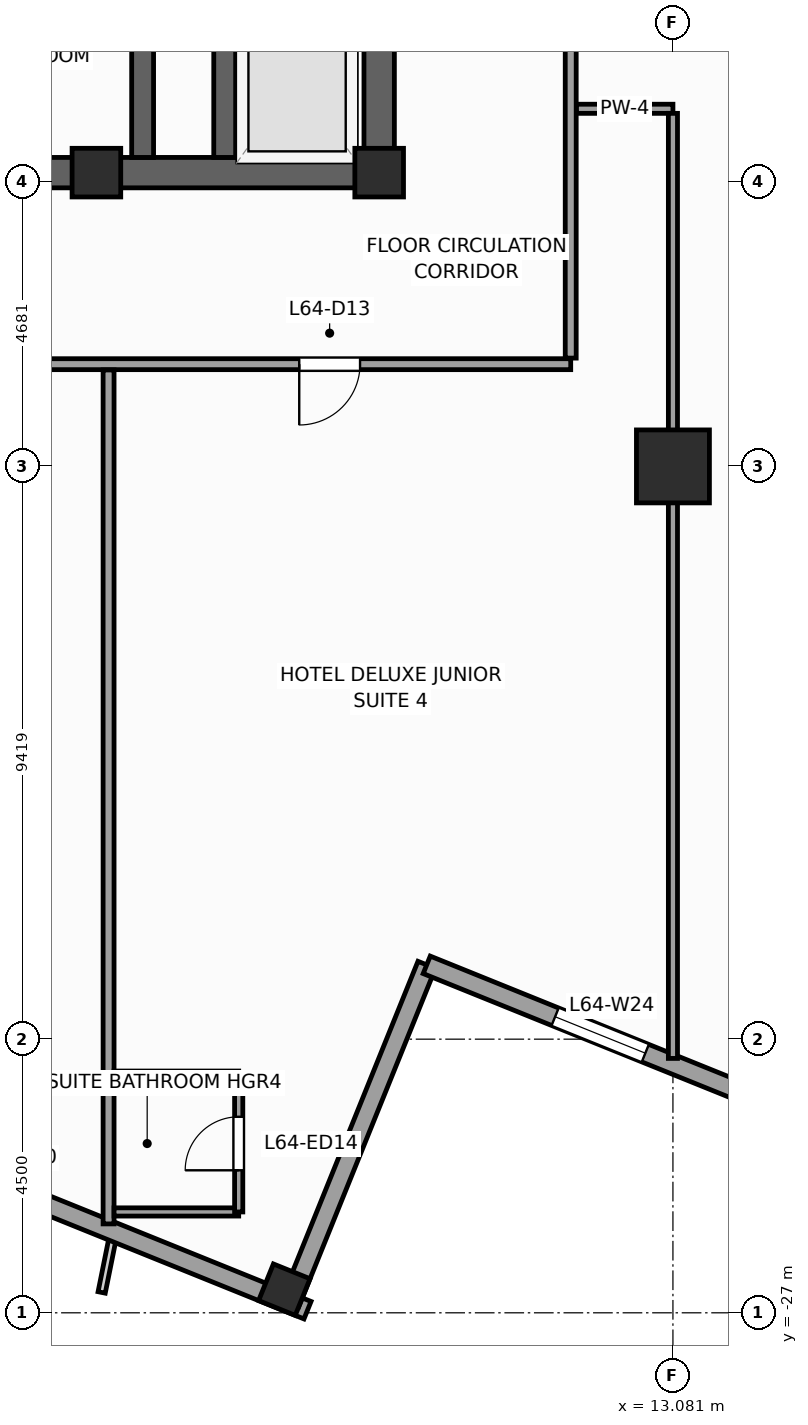
"""IFC4 building model, lengths in metres.
Left out: names, types, materials, properties, quantities, classifications, styles, units other than length and angle.
Written with IfcOpenShell. Run it as: python <this file> out.ifc"""

import sys

from ifc_helpers import new_model, si_unit, direction, frame, frame_2d, origin, origin_2d, place, context, subcontext, project, spatial, rectangle, extrude, source, transform, mapped, element, fill, save


model = new_model("IFC4")
c1 = context("Model", 3, precision=1e-05, world=origin(), true_north=direction((0.0, 1.0)))
c2 = subcontext(c1, "Body", "Model", "MODEL_VIEW")
j1 = project(units=[si_unit("LENGTHUNIT", "METRE"), si_unit("PLANEANGLEUNIT", "RADIAN")], contexts=[c1])
p1 = place(None, origin())
s1 = spatial("IfcSite", under=j1, at=p1, CompositionType="ELEMENT")
p2 = place(p1, origin())
s2 = spatial("IfcBuilding", under=s1, at=p2, CompositionType="ELEMENT")
p3 = place(p2, frame((0.0, 0.0, 265.2)))
s3 = spatial("IfcBuildingStorey", under=s2, at=p3, CompositionType="ELEMENT", Elevation=265.2)
p4 = place(p3, frame((-8.5, -8.25, 0.0), z_axis=(0.0, 0.0, 1.0), x_axis=(1.0, 0.0, 0.0)))
e1 = element("IfcWall", 1, at=p4, inside=s3, PredefinedType="SHEAR", context=c2, shape_type="SweptSolid", body=[
    extrude(rectangle(XDim=17.0, YDim=0.5, at=frame_2d((8.5, 0.0))), origin(), (0.0, 0.0, 1.0), 3.6),
])
p5 = place(p4, frame((7.85, 0.0, 0.0)))
e2 = element("IfcOpeningElement", 2, at=p5, cuts=e1, PredefinedType="OPENING", context=c2, shape_type="SweptSolid", body=[
    extrude(rectangle(XDim=1.3, YDim=2.2, at=frame_2d((0.65, 1.1))), frame((0.0, 0.26, 0.0), z_axis=(0.0, -1.0, 0.0), x_axis=(1.0, 0.0, 0.0)), (0.0, 0.0, 1.0), 0.52),
])
p6 = place(p3, frame((8.25, -8.0, 0.0), z_axis=(0.0, 0.0, 1.0), x_axis=(0.0, 1.0, 0.0)))
e3 = element("IfcWall", 3, at=p6, inside=s3, PredefinedType="SHEAR", context=c2, shape_type="SweptSolid", body=[
    extrude(rectangle(XDim=16.0, YDim=0.5, at=frame_2d((8.0, 0.0))), origin(), (0.0, 0.0, 1.0), 3.6),
])
p7 = place(p6, frame((4.69, 0.0, 0.0)))
e4 = element("IfcOpeningElement", 4, at=p7, cuts=e3, PredefinedType="OPENING", context=c2, shape_type="SweptSolid", body=[
    extrude(rectangle(XDim=1.3, YDim=2.2, at=frame_2d((0.65, 1.1))), frame((0.0, 0.26, 0.0), z_axis=(0.0, -1.0, 0.0), x_axis=(1.0, 0.0, 0.0)), (0.0, 0.0, 1.0), 0.52),
])
p8 = place(p3, frame((4.36, -8.0, 0.0), z_axis=(0.0, 0.0, 1.0), x_axis=(0.0, 1.0, 0.0)))
e5 = element("IfcWall", 5, at=p8, inside=s3, PredefinedType="SHEAR", context=c2, shape_type="SweptSolid", body=[
    extrude(rectangle(XDim=16.0, YDim=0.36, at=frame_2d((8.0, 0.0))), origin(), (0.0, 0.0, 1.0), 3.6),
])
p9 = place(p3, frame((5.71, -8.0, 0.0), z_axis=(0.0, 0.0, 1.0), x_axis=(0.0, 1.0, 0.0)))
e6 = element("IfcWall", 6, at=p9, inside=s3, PredefinedType="SHEAR", context=c2, shape_type="SweptSolid", body=[
    extrude(rectangle(XDim=2.54, YDim=0.36, at=frame_2d((1.27, 0.0))), origin(), (0.0, 0.0, 1.0), 3.6),
])
m1 = source(origin(), c2, "Body", "SweptSolid", [
    extrude(rectangle(XDim=0.8, YDim=0.8, at=origin_2d()), origin(), (0.0, 0.0, 1.0), 3.6),
])
for number, where, z_axis, x_axis in (
    (7, (8.25, -8.25, 0.0), (0.0, 0.0, 1.0), (1.0, 0.0, 0.0)),
    (8, (3.6, -8.25, 0.0), (0.0, 0.0, 1.0), (1.0, 0.0, 0.0)),
):
    element("IfcColumn", number, at=place(p3, frame(where, z_axis=z_axis, x_axis=x_axis)), inside=s3, PredefinedType="PILASTER", context=c2, shape_type="MappedRepresentation", body=[
        mapped(m1, transform((0.0, 0.0, 0.0), scale=1.0)),
    ])
m2 = source(origin(), c2, "Body", "SweptSolid", [
    extrude(rectangle(XDim=1.2, YDim=1.2, at=origin_2d()), origin(), (0.0, 0.0, 1.0), 3.6),
])
p10 = place(p3, frame((13.081, -13.081, 0.0), z_axis=(0.0, 0.0, 1.0), x_axis=(1.0, 0.0, 0.0)))
e9 = element("IfcColumn", 9, at=p10, inside=s3, PredefinedType="COLUMN", context=c2, shape_type="MappedRepresentation", body=[
    mapped(m2, transform((0.0, 0.0, 0.0), scale=1.0)),
])
m3 = source(origin(), c2, "Body", "SweptSolid", [
    extrude(rectangle(XDim=0.65, YDim=0.65, at=origin_2d()), origin(), (0.0, 0.0, 1.0), 3.6),
])
p11 = place(p3, frame((6.69, -26.62, 0.0), z_axis=(0.0, 0.0, 1.0), x_axis=(0.374606593416, 0.927183854567, 0.0)))
e10 = element("IfcColumn", 10, at=p11, inside=s3, PredefinedType="COLUMN", context=c2, shape_type="MappedRepresentation", body=[
    mapped(m3, transform((0.0, 0.0, 0.0), scale=1.0)),
])
p12 = place(p3, frame((-23.813, -14.479, 0.0), z_axis=(0.0, 0.0, 1.0), x_axis=(0.927182657188, -0.374609557019, 0.0)))
e11 = element("IfcWall", 11, at=p12, inside=s3, PredefinedType="STANDARD", context=c2, shape_type="SweptSolid", body=[
    extrude(rectangle(XDim=33.31, YDim=0.31, at=frame_2d((16.655, 0.0))), origin(), (0.0, 0.0, 1.0), 2.75),
])
p13 = place(p12, frame((22.58, 0.0, 0.0)))
e12 = element("IfcOpeningElement", 12, at=p13, cuts=e11, PredefinedType="OPENING", context=c2, shape_type="SweptSolid", body=[
    extrude(rectangle(XDim=1.05, YDim=2.25, at=frame_2d((0.525, 1.125))), frame((0.0, 0.165, 0.0), z_axis=(0.0, -1.0, 0.0), x_axis=(1.0, 0.0, 0.0)), (0.0, 0.0, 1.0), 0.33),
])
p14 = place(p12, frame((3.197, 0.0, 0.47)))
e13 = element("IfcOpeningElement", 13, at=p14, cuts=e11, PredefinedType="OPENING", context=c2, shape_type="SweptSolid", body=[
    extrude(rectangle(XDim=1.6, YDim=2.1, at=frame_2d((0.8, 1.05))), frame((0.0, 0.165, 0.0), z_axis=(0.0, -1.0, 0.0), x_axis=(1.0, 0.0, 0.0)), (0.0, 0.0, 1.0), 0.33),
])
p15 = place(p12, frame((8.86, 0.0, 0.47)))
e14 = element("IfcOpeningElement", 14, at=p15, cuts=e11, PredefinedType="OPENING", context=c2, shape_type="SweptSolid", body=[
    extrude(rectangle(XDim=1.6, YDim=2.1, at=frame_2d((0.8, 1.05))), frame((0.0, 0.165, 0.0), z_axis=(0.0, -1.0, 0.0), x_axis=(1.0, 0.0, 0.0)), (0.0, 0.0, 1.0), 0.33),
])
p16 = place(p12, frame((14.439, 0.0, 0.47)))
e15 = element("IfcOpeningElement", 15, at=p16, cuts=e11, PredefinedType="OPENING", context=c2, shape_type="SweptSolid", body=[
    extrude(rectangle(XDim=1.6, YDim=2.1, at=frame_2d((0.8, 1.05))), frame((0.0, 0.165, 0.0), z_axis=(0.0, -1.0, 0.0), x_axis=(1.0, 0.0, 0.0)), (0.0, 0.0, 1.0), 0.33),
])
p17 = place(p12, frame((19.601, 0.0, 0.47)))
e16 = element("IfcOpeningElement", 16, at=p17, cuts=e11, PredefinedType="OPENING", context=c2, shape_type="SweptSolid", body=[
    extrude(rectangle(XDim=1.6, YDim=2.1, at=frame_2d((0.8, 1.05))), frame((0.0, 0.165, 0.0), z_axis=(0.0, -1.0, 0.0), x_axis=(1.0, 0.0, 0.0)), (0.0, 0.0, 1.0), 0.33),
])
p18 = place(p12, frame((27.097, 0.0, 0.47)))
e17 = element("IfcOpeningElement", 17, at=p18, cuts=e11, PredefinedType="OPENING", context=c2, shape_type="SweptSolid", body=[
    extrude(rectangle(XDim=1.6, YDim=2.1, at=frame_2d((0.8, 1.05))), frame((0.0, 0.165, 0.0), z_axis=(0.0, -1.0, 0.0), x_axis=(1.0, 0.0, 0.0)), (0.0, 0.0, 1.0), 0.33),
])
p19 = place(p3, frame((6.784, -26.841, 0.0), z_axis=(0.0, 0.0, 1.0), x_axis=(0.374636620962, 0.927171722085, 0.0)))
e18 = element("IfcWall", 18, at=p19, inside=s3, PredefinedType="STANDARD", context=c2, shape_type="SweptSolid", body=[
    extrude(rectangle(XDim=6.0, YDim=0.31, at=frame_2d((3.0, 0.0))), origin(), (0.0, 0.0, 1.0), 2.65),
])
p20 = place(p3, frame((9.032, -21.278, 0.0), z_axis=(0.0, 0.0, 1.0), x_axis=(0.927185411764, -0.374602739196, 0.0)))
e19 = element("IfcWall", 19, at=p20, inside=s3, PredefinedType="STANDARD", context=c2, shape_type="SweptSolid", body=[
    extrude(rectangle(XDim=6.155, YDim=0.31, at=frame_2d((3.078, 0.0))), origin(), (0.0, 0.0, 1.0), 3.35),
])
p21 = place(p20, frame((2.278, 0.0, 0.47)))
e20 = element("IfcOpeningElement", 20, at=p21, cuts=e19, PredefinedType="OPENING", context=c2, shape_type="SweptSolid", body=[
    extrude(rectangle(XDim=1.6, YDim=2.1, at=frame_2d((0.8, 1.05))), frame((0.0, 0.165, 0.0), z_axis=(0.0, -1.0, 0.0), x_axis=(1.0, 0.0, 0.0)), (0.0, 0.0, 1.0), 0.33),
])
p22 = place(p3, frame((-10.3, -11.4, 0.0), z_axis=(0.0, 0.0, 1.0), x_axis=(1.0, 0.0, 0.0)))
e21 = element("IfcWall", 21, at=p22, inside=s3, PredefinedType="PARTITIONING", context=c2, shape_type="SweptSolid", body=[
    extrude(rectangle(XDim=21.7, YDim=0.18, at=frame_2d((10.85, 0.0))), origin(), (0.0, 0.0, 1.0), 3.35),
])
p23 = place(p22, frame((1.605, 0.0, 0.0)))
e22 = element("IfcOpeningElement", 22, at=p23, cuts=e21, PredefinedType="OPENING", context=c2, shape_type="SweptSolid", body=[
    extrude(rectangle(XDim=0.95, YDim=2.1, at=frame_2d((0.475, 1.05))), frame((0.0, 0.1, 0.0), z_axis=(0.0, -1.0, 0.0), x_axis=(1.0, 0.0, 0.0)), (0.0, 0.0, 1.0), 0.2),
])
p24 = place(p22, frame((17.236, 0.0, 0.0)))
e23 = element("IfcOpeningElement", 23, at=p24, cuts=e21, PredefinedType="OPENING", context=c2, shape_type="SweptSolid", body=[
    extrude(rectangle(XDim=1.0, YDim=2.15, at=frame_2d((0.5, 1.075))), frame((0.0, 0.1, 0.0), z_axis=(0.0, -1.0, 0.0), x_axis=(1.0, 0.0, 0.0)), (0.0, 0.0, 1.0), 0.2),
])
p25 = place(p22, frame((9.8, 0.0, 0.0)))
e24 = element("IfcOpeningElement", 24, at=p25, cuts=e21, PredefinedType="OPENING", context=c2, shape_type="SweptSolid", body=[
    extrude(rectangle(XDim=1.0, YDim=2.15, at=frame_2d((0.5, 1.075))), frame((0.0, 0.1, 0.0), z_axis=(0.0, -1.0, 0.0), x_axis=(1.0, 0.0, 0.0)), (0.0, 0.0, 1.0), 0.2),
])
p26 = place(p3, frame((11.4, -11.3, 0.0), z_axis=(0.0, 0.0, 1.0), x_axis=(0.0, 1.0, 0.0)))
e25 = element("IfcWall", 25, at=p26, inside=s3, PredefinedType="PARTITIONING", context=c2, shape_type="SweptSolid", body=[
    extrude(rectangle(XDim=21.5, YDim=0.18, at=frame_2d((10.75, 0.0))), origin(), (0.0, 0.0, 1.0), 3.35),
])
p27 = place(p26, frame((17.536, 0.0, 0.0)))
e26 = element("IfcOpeningElement", 26, at=p27, cuts=e25, PredefinedType="OPENING", context=c2, shape_type="SweptSolid", body=[
    extrude(rectangle(XDim=1.0, YDim=2.15, at=frame_2d((0.5, 1.075))), frame((0.0, 0.1, 0.0), z_axis=(0.0, -1.0, 0.0), x_axis=(1.0, 0.0, 0.0)), (0.0, 0.0, 1.0), 0.2),
])
p28 = place(p26, frame((10.8, 0.0, 0.0)))
e27 = element("IfcOpeningElement", 27, at=p28, cuts=e25, PredefinedType="OPENING", context=c2, shape_type="SweptSolid", body=[
    extrude(rectangle(XDim=1.0, YDim=2.15, at=frame_2d((0.5, 1.075))), frame((0.0, 0.1, 0.0), z_axis=(0.0, -1.0, 0.0), x_axis=(1.0, 0.0, 0.0)), (0.0, 0.0, 1.0), 0.2),
])
p29 = place(p26, frame((5.4, 0.0, 0.0)))
e28 = element("IfcOpeningElement", 28, at=p29, cuts=e25, PredefinedType="OPENING", context=c2, shape_type="SweptSolid", body=[
    extrude(rectangle(XDim=1.0, YDim=2.15, at=frame_2d((0.5, 1.075))), frame((0.0, 0.1, 0.0), z_axis=(0.0, -1.0, 0.0), x_axis=(1.0, 0.0, 0.0)), (0.0, 0.0, 1.0), 0.2),
])
p30 = place(p3, frame((3.8, -11.495, 0.0), z_axis=(0.0, 0.0, 1.0), x_axis=(0.0, -1.0, 0.0)))
e29 = element("IfcWall", 29, at=p30, inside=s3, PredefinedType="PARTITIONING", context=c2, shape_type="SweptSolid", body=[
    extrude(rectangle(XDim=14.043, YDim=0.18, at=frame_2d((7.021, 0.0))), origin(), (0.0, 0.0, 1.0), 3.35),
])
p31 = place(p3, frame((11.495, -7.2, 0.0), z_axis=(0.0, 0.0, 1.0), x_axis=(1.0, 0.0, 0.0)))
e30 = element("IfcWall", 30, at=p31, inside=s3, PredefinedType="PARTITIONING", context=c2, shape_type="SweptSolid", body=[
    extrude(rectangle(XDim=1.586, YDim=0.15, at=frame_2d((0.793, 0.0))), origin(), (0.0, 0.0, 1.0), 3.35),
])
p32 = place(p3, frame((13.081, -7.275, 0.0), z_axis=(0.0, 0.0, 1.0), x_axis=(0.0, -1.0, 0.0)))
e31 = element("IfcWall", 31, at=p32, inside=s3, PredefinedType="PARTITIONING", context=c2, shape_type="SweptSolid", body=[
    extrude(rectangle(XDim=15.542, YDim=0.15, at=frame_2d((7.771, 0.0))), origin(), (0.0, 0.0, 1.0), 2.45),
])
p33 = place(p3, frame((3.89, -25.342, 0.0), z_axis=(0.0, 0.0, 1.0), x_axis=(1.0, 0.0, 0.0)))
e32 = element("IfcWall", 32, at=p33, inside=s3, PredefinedType="PARTITIONING", context=c2, shape_type="SweptSolid", body=[
    extrude(rectangle(XDim=2.05, YDim=0.135, at=frame_2d((1.025, 0.0))), origin(), (0.0, 0.0, 1.0), 2.75),
])
p34 = place(p3, frame((5.94, -25.342, 0.0), z_axis=(0.0, 0.0, 1.0), x_axis=(0.0, 1.0, 0.0)))
e33 = element("IfcWall", 33, at=p34, inside=s3, PredefinedType="PARTITIONING", context=c2, shape_type="SweptSolid", body=[
    extrude(rectangle(XDim=2.25, YDim=0.135, at=frame_2d((1.125, 0.0))), origin(), (0.0, 0.0, 1.0), 3.35),
])
p35 = place(p34, frame((0.685, 0.0, 0.0)))
e34 = element("IfcOpeningElement", 34, at=p35, cuts=e33, PredefinedType="OPENING", context=c2, shape_type="SweptSolid", body=[
    extrude(rectangle(XDim=0.88, YDim=2.1, at=frame_2d((0.44, 1.05))), frame((0.0, 0.078, 0.0), z_axis=(0.0, -1.0, 0.0), x_axis=(1.0, 0.0, 0.0)), (0.0, 0.0, 1.0), 0.155),
])
p36 = place(p3, frame((3.89, -23.092, 0.0), z_axis=(0.0, 0.0, 1.0), x_axis=(1.0, 0.0, 0.0)))
e35 = element("IfcWall", 35, at=p36, inside=s3, PredefinedType="PARTITIONING", context=c2, shape_type="SweptSolid", body=[
    extrude(rectangle(XDim=2.05, YDim=0.135, at=frame_2d((1.025, 0.0))), origin(), (0.0, 0.0, 1.0), 2.95),
])
m4 = source(origin(), c2, "Body", "SweptSolid", [
    extrude(rectangle(XDim=1.6, YDim=2.1, at=frame_2d((0.8, 1.05))), frame((0.0, 0.03, 0.0), z_axis=(0.0, -1.0, 0.0), x_axis=(1.0, 0.0, 0.0)), (0.0, 0.0, 1.0), 0.06),
])
p37 = place(p21, origin())
e36 = element("IfcWindow", 36, at=p37, inside=s3, PartitioningType="SINGLE_PANEL", PredefinedType="WINDOW", context=c2, shape_type="MappedRepresentation", body=[
    mapped(m4, transform((0.0, 0.0, 0.0), scale=1.0)),
])
fill(e20, e36)
m5 = source(origin(), c2, "Body", "SweptSolid", [
    extrude(rectangle(XDim=1.0, YDim=2.15, at=frame_2d((0.5, 1.075))), frame((0.0, 0.025, 0.0), z_axis=(0.0, -1.0, 0.0), x_axis=(1.0, 0.0, 0.0)), (0.0, 0.0, 1.0), 0.05),
])
p38 = place(p24, frame((1.0, 0.0, 0.0), z_axis=(0.0, 0.0, 1.0), x_axis=(-1.0, 0.0, 0.0)))
e37 = element("IfcDoor", 37, at=p38, inside=s3, OperationType="SINGLE_SWING_LEFT", PredefinedType="DOOR", context=c2, shape_type="MappedRepresentation", body=[
    mapped(m5, transform((0.0, 0.0, 0.0), scale=1.0)),
])
fill(e23, e37)
m6 = source(origin(), c2, "Body", "SweptSolid", [
    extrude(rectangle(XDim=0.88, YDim=2.1, at=frame_2d((0.44, 1.05))), frame((0.0, 0.025, 0.0), z_axis=(0.0, -1.0, 0.0), x_axis=(1.0, 0.0, 0.0)), (0.0, 0.0, 1.0), 0.05),
])
p39 = place(p35, origin())
e38 = element("IfcDoor", 38, at=p39, inside=s3, OperationType="SINGLE_SWING_LEFT", PredefinedType="DOOR", context=c2, shape_type="MappedRepresentation", body=[
    mapped(m6, transform((0.0, 0.0, 0.0), scale=1.0)),
])
fill(e34, e38)
save(model, sys.argv[1])
